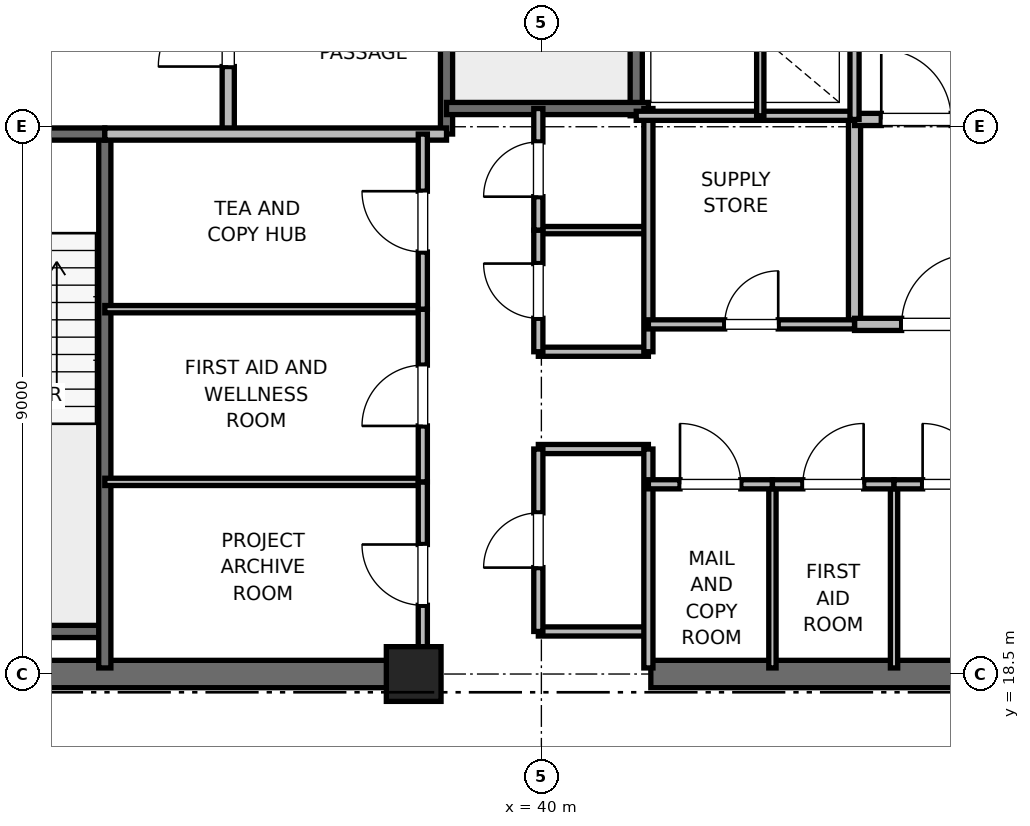
"""IFC4 building model, lengths in metres.
Left out: names, types, materials, properties, quantities, classifications, styles, units other than length and angle.
Written with IfcOpenShell. Run it as: python <this file> out.ifc"""

import sys

from ifc_helpers import new_model, si_unit, direction, frame, frame_2d, origin, origin_2d, place, context, subcontext, project, spatial, rectangle, extrude, element, fill, save


model = new_model("IFC4")
c1 = context("Model", 3, precision=1e-05, world=origin(), true_north=direction((0.0, 1.0)))
c2 = subcontext(c1, "Body", "Model", "MODEL_VIEW")
j1 = project(units=[si_unit("LENGTHUNIT", "METRE"), si_unit("PLANEANGLEUNIT", "RADIAN")], contexts=[c1])
p1 = place(None, origin())
s1 = spatial("IfcSite", under=j1, at=p1, CompositionType="ELEMENT")
p2 = place(p1, origin())
s2 = spatial("IfcBuilding", under=s1, at=p2, CompositionType="ELEMENT")
p3 = place(p2, frame((0.0, 0.0, 283.2)))
s3 = spatial("IfcBuildingStorey", under=s2, at=p3, CompositionType="ELEMENT", Elevation=283.2)
p4 = place(p3, frame((37.9, 18.5, 0.0), z_axis=(0.0, 0.0, 1.0), x_axis=(1.0, 0.0, 0.0)))
e1 = element("IfcColumn", 1, at=p4, inside=s3, PredefinedType="PILASTER", context=c2, shape_type="SweptSolid", body=[
    extrude(rectangle(XDim=0.9, YDim=0.9, at=origin_2d()), origin(), (0.0, 0.0, 1.0), 4.0),
])
for number, where, z_axis, x_axis in (
    (2, (29.0, 18.5, 0.0), (0.0, 0.0, 1.0), (1.0, 0.0, 0.0)),
    (3, (41.8, 18.5, 0.0), (0.0, 0.0, 1.0), (1.0, 0.0, 0.0)),
):
    element("IfcWall", number, at=place(p3, frame(where, z_axis=z_axis, x_axis=x_axis)), inside=s3, PredefinedType="SHEAR", context=c2, shape_type="SweptSolid", body=[
        extrude(rectangle(XDim=9.2, YDim=0.45, at=frame_2d((4.6, 0.0))), origin(), (0.0, 0.0, 1.0), 3.785),
    ])
p5 = place(p3, frame((29.7, 19.2, 0.0), z_axis=(0.0, 0.0, 1.0), x_axis=(1.0, 0.0, 0.0)))
e4 = element("IfcWall", 4, at=p5, inside=s3, PredefinedType="SOLIDWALL", context=c2, shape_type="SweptSolid", body=[
    extrude(rectangle(XDim=3.12, YDim=0.2, at=frame_2d((1.56, 0.0))), origin(), (0.0, 0.0, 1.0), 3.785),
])
p6 = place(p3, frame((32.82, 18.6, 0.0), z_axis=(0.0, 0.0, 1.0), x_axis=(0.0, 1.0, 0.0)))
e5 = element("IfcWall", 5, at=p6, inside=s3, PredefinedType="SOLIDWALL", context=c2, shape_type="SweptSolid", body=[
    extrude(rectangle(XDim=8.78, YDim=0.2, at=frame_2d((4.39, 0.0))), origin(), (0.0, 0.0, 1.0), 3.785),
])
p7 = place(p3, frame((29.7, 27.38, 0.0), z_axis=(0.0, 0.0, 1.0), x_axis=(1.0, 0.0, 0.0)))
e6 = element("IfcWall", 6, at=p7, inside=s3, PredefinedType="SOLIDWALL", context=c2, shape_type="SweptSolid", body=[
    extrude(rectangle(XDim=3.12, YDim=0.2, at=frame_2d((1.56, 0.0))), origin(), (0.0, 0.0, 1.0), 3.785),
])
p8 = place(p7, frame((1.01, 0.0, 0.0)))
e7 = element("IfcOpeningElement", 7, at=p8, cuts=e6, PredefinedType="OPENING", context=c2, shape_type="SweptSolid", body=[
    extrude(rectangle(XDim=1.1, YDim=2.15, at=frame_2d((0.55, 1.075))), frame((0.0, 0.1, 0.0), z_axis=(0.0, -1.0, 0.0), x_axis=(1.0, 0.0, 0.0)), (0.0, 0.0, 1.0), 0.2),
])
p9 = place(p3, frame((38.44, 27.38, 0.0), z_axis=(0.0, 0.0, 1.0), x_axis=(0.0, 1.0, 0.0)))
e8 = element("IfcWall", 8, at=p9, inside=s3, PredefinedType="SOLIDWALL", context=c2, shape_type="SweptSolid", body=[
    extrude(rectangle(XDim=8.87, YDim=0.2, at=frame_2d((4.435, 0.0))), origin(), (0.0, 0.0, 1.0), 3.785),
])
p10 = place(p3, frame((41.56, 27.68, 0.0), z_axis=(0.0, 0.0, 1.0), x_axis=(0.0, 1.0, 0.0)))
e9 = element("IfcWall", 9, at=p10, inside=s3, PredefinedType="SOLIDWALL", context=c2, shape_type="SweptSolid", body=[
    extrude(rectangle(XDim=8.57, YDim=0.2, at=frame_2d((4.285, 0.0))), origin(), (0.0, 0.0, 1.0), 3.785),
])
p11 = place(p3, frame((38.44, 27.8, 0.0), z_axis=(0.0, 0.0, 1.0), x_axis=(1.0, 0.0, 0.0)))
e10 = element("IfcWall", 10, at=p11, inside=s3, PredefinedType="SOLIDWALL", context=c2, shape_type="SweptSolid", body=[
    extrude(rectangle(XDim=3.32, YDim=0.2, at=frame_2d((1.66, 0.0))), origin(), (0.0, 0.0, 1.0), 3.785),
])
p12 = place(p3, frame((34.85, 27.38, 0.0), z_axis=(0.0, 0.0, 1.0), x_axis=(0.0, 1.0, 0.0)))
e11 = element("IfcWall", 11, at=p12, inside=s3, PredefinedType="PARTITIONING", context=c2, shape_type="SweptSolid", body=[
    extrude(rectangle(XDim=3.37, YDim=0.2, at=frame_2d((1.685, 0.0))), origin(), (0.0, 0.0, 1.0), 3.785),
])
p13 = place(p12, frame((1.11, 0.0, 0.0)))
e12 = element("IfcOpeningElement", 12, at=p13, cuts=e11, PredefinedType="OPENING", context=c2, shape_type="SweptSolid", body=[
    extrude(rectangle(XDim=1.15, YDim=2.2, at=frame_2d((0.575, 1.1))), frame((0.0, 0.1, 0.0), z_axis=(0.0, -1.0, 0.0), x_axis=(1.0, 0.0, 0.0)), (0.0, 0.0, 1.0), 0.2),
])
p14 = place(p3, frame((32.82, 27.38, 0.0), z_axis=(0.0, 0.0, 1.0), x_axis=(1.0, 0.0, 0.0)))
e13 = element("IfcWall", 13, at=p14, inside=s3, PredefinedType="PARTITIONING", context=c2, shape_type="SweptSolid", body=[
    extrude(rectangle(XDim=5.62, YDim=0.2, at=frame_2d((2.81, 0.0))), origin(), (0.0, 0.0, 1.0), 3.785),
])
p15 = place(p3, frame((45.15, 24.25, 0.0), z_axis=(0.0, 0.0, 1.0), x_axis=(0.0, 1.0, 0.0)))
e14 = element("IfcWall", 14, at=p15, inside=s3, PredefinedType="PARTITIONING", context=c2, shape_type="SweptSolid", body=[
    extrude(rectangle(XDim=3.37, YDim=0.2, at=frame_2d((1.685, 0.0))), origin(), (0.0, 0.0, 1.0), 3.785),
])
p16 = place(p3, frame((45.15, 24.25, 0.0), z_axis=(0.0, 0.0, 1.0), x_axis=(1.0, 0.0, 0.0)))
e15 = element("IfcWall", 15, at=p16, inside=s3, PredefinedType="PARTITIONING", context=c2, shape_type="SweptSolid", body=[
    extrude(rectangle(XDim=2.7, YDim=0.2, at=frame_2d((1.35, 0.0))), origin(), (0.0, 0.0, 1.0), 3.785),
])
p17 = place(p16, frame((0.775, 0.0, 0.0)))
e16 = element("IfcOpeningElement", 16, at=p17, cuts=e15, PredefinedType="OPENING", context=c2, shape_type="SweptSolid", body=[
    extrude(rectangle(XDim=1.15, YDim=2.2, at=frame_2d((0.575, 1.1))), frame((0.0, 0.1, 0.0), z_axis=(0.0, -1.0, 0.0), x_axis=(1.0, 0.0, 0.0)), (0.0, 0.0, 1.0), 0.2),
])
p18 = place(p3, frame((45.15, 27.62, 0.0), z_axis=(0.0, 0.0, 1.0), x_axis=(1.0, 0.0, 0.0)))
e17 = element("IfcWall", 17, at=p18, inside=s3, PredefinedType="PARTITIONING", context=c2, shape_type="SweptSolid", body=[
    extrude(rectangle(XDim=2.03, YDim=0.2, at=frame_2d((1.015, 0.0))), origin(), (0.0, 0.0, 1.0), 3.785),
])
p19 = place(p18, frame((0.44, 0.0, 0.0)))
e18 = element("IfcOpeningElement", 18, at=p19, cuts=e17, PredefinedType="OPENING", context=c2, shape_type="SweptSolid", body=[
    extrude(rectangle(XDim=1.15, YDim=2.2, at=frame_2d((0.575, 1.1))), frame((0.0, 0.1, 0.0), z_axis=(0.0, -1.0, 0.0), x_axis=(1.0, 0.0, 0.0)), (0.0, 0.0, 1.0), 0.2),
])
for number, where, z_axis, x_axis in (
    (19, (39.95, 19.2, 0.0), (0.0, 0.0, 1.0), (1.0, 0.0, 0.0)),
    (20, (39.95, 22.2, 0.0), (0.0, 0.0, 1.0), (1.0, 0.0, 0.0)),
    (21, (39.95, 23.8, 0.0), (0.0, 0.0, 1.0), (1.0, 0.0, 0.0)),
):
    element("IfcWall", number, at=place(p3, frame(where, z_axis=z_axis, x_axis=x_axis)), inside=s3, PredefinedType="PARTITIONING", context=c2, shape_type="SweptSolid", body=[
        extrude(rectangle(XDim=1.81, YDim=0.15, at=frame_2d((0.905, 0.0))), origin(), (0.0, 0.0, 1.0), 2.85),
    ])
p20 = place(p3, frame((39.95, 25.8, 0.0), z_axis=(0.0, 0.0, 1.0), x_axis=(1.0, 0.0, 0.0)))
e22 = element("IfcWall", 22, at=p20, inside=s3, PredefinedType="PARTITIONING", context=c2, shape_type="SweptSolid", body=[
    extrude(rectangle(XDim=1.81, YDim=0.12, at=frame_2d((0.905, 0.0))), origin(), (0.0, 0.0, 1.0), 2.85),
])
p21 = place(p3, frame((41.76, 18.6, 0.0), z_axis=(0.0, 0.0, 1.0), x_axis=(0.0, 1.0, 0.0)))
e23 = element("IfcWall", 23, at=p21, inside=s3, PredefinedType="PARTITIONING", context=c2, shape_type="SweptSolid", body=[
    extrude(rectangle(XDim=3.6, YDim=0.15, at=frame_2d((1.8, 0.0))), origin(), (0.0, 0.0, 1.0), 2.85),
])
p22 = place(p3, frame((41.76, 23.8, 0.0), z_axis=(0.0, 0.0, 1.0), x_axis=(0.0, 1.0, 0.0)))
e24 = element("IfcWall", 24, at=p22, inside=s3, PredefinedType="PARTITIONING", context=c2, shape_type="SweptSolid", body=[
    extrude(rectangle(XDim=4.0, YDim=0.15, at=frame_2d((2.0, 0.0))), origin(), (0.0, 0.0, 1.0), 2.85),
])
p23 = place(p3, frame((39.95, 19.2, 0.0), z_axis=(0.0, 0.0, 1.0), x_axis=(0.0, 1.0, 0.0)))
e25 = element("IfcWall", 25, at=p23, inside=s3, PredefinedType="PARTITIONING", context=c2, shape_type="SweptSolid", body=[
    extrude(rectangle(XDim=3.0, YDim=0.15, at=frame_2d((1.5, 0.0))), origin(), (0.0, 0.0, 1.0), 2.85),
])
p24 = place(p23, frame((1.05, 0.0, 0.0)))
e26 = element("IfcOpeningElement", 26, at=p24, cuts=e25, PredefinedType="OPENING", context=c2, shape_type="SweptSolid", body=[
    extrude(rectangle(XDim=0.9, YDim=2.1, at=frame_2d((0.45, 1.05))), frame((0.0, 0.075, 0.0), z_axis=(0.0, -1.0, 0.0), x_axis=(1.0, 0.0, 0.0)), (0.0, 0.0, 1.0), 0.15),
])
p25 = place(p3, frame((39.95, 23.8, 0.0), z_axis=(0.0, 0.0, 1.0), x_axis=(0.0, 1.0, 0.0)))
e27 = element("IfcWall", 27, at=p25, inside=s3, PredefinedType="PARTITIONING", context=c2, shape_type="SweptSolid", body=[
    extrude(rectangle(XDim=2.0, YDim=0.15, at=frame_2d((1.0, 0.0))), origin(), (0.0, 0.0, 1.0), 2.85),
])
p26 = place(p25, frame((0.55, 0.0, 0.0)))
e28 = element("IfcOpeningElement", 28, at=p26, cuts=e27, PredefinedType="OPENING", context=c2, shape_type="SweptSolid", body=[
    extrude(rectangle(XDim=0.9, YDim=2.1, at=frame_2d((0.45, 1.05))), frame((0.0, 0.075, 0.0), z_axis=(0.0, -1.0, 0.0), x_axis=(1.0, 0.0, 0.0)), (0.0, 0.0, 1.0), 0.15),
])
p27 = place(p3, frame((39.95, 25.8, 0.0), z_axis=(0.0, 0.0, 1.0), x_axis=(0.0, 1.0, 0.0)))
e29 = element("IfcWall", 29, at=p27, inside=s3, PredefinedType="PARTITIONING", context=c2, shape_type="SweptSolid", body=[
    extrude(rectangle(XDim=2.0, YDim=0.15, at=frame_2d((1.0, 0.0))), origin(), (0.0, 0.0, 1.0), 2.85),
])
p28 = place(p27, frame((0.55, 0.0, 0.0)))
e30 = element("IfcOpeningElement", 30, at=p28, cuts=e29, PredefinedType="OPENING", context=c2, shape_type="SweptSolid", body=[
    extrude(rectangle(XDim=0.9, YDim=2.1, at=frame_2d((0.45, 1.05))), frame((0.0, 0.075, 0.0), z_axis=(0.0, -1.0, 0.0), x_axis=(1.0, 0.0, 0.0)), (0.0, 0.0, 1.0), 0.15),
])
for number, where, z_axis, x_axis in (
    (31, (32.82, 21.66, 0.0), (0.0, 0.0, 1.0), (1.0, 0.0, 0.0)),
    (32, (32.82, 24.5, 0.0), (0.0, 0.0, 1.0), (1.0, 0.0, 0.0)),
):
    element("IfcWall", number, at=place(p3, frame(where, z_axis=z_axis, x_axis=x_axis)), inside=s3, PredefinedType="PARTITIONING", context=c2, shape_type="SweptSolid", body=[
        extrude(rectangle(XDim=5.23, YDim=0.12, at=frame_2d((2.615, 0.0))), origin(), (0.0, 0.0, 1.0), 2.85),
    ])
p29 = place(p3, frame((38.05, 18.6, 0.0), z_axis=(0.0, 0.0, 1.0), x_axis=(0.0, 1.0, 0.0)))
e33 = element("IfcWall", 33, at=p29, inside=s3, PredefinedType="PARTITIONING", context=c2, shape_type="SweptSolid", body=[
    extrude(rectangle(XDim=3.06, YDim=0.15, at=frame_2d((1.53, 0.0))), origin(), (0.0, 0.0, 1.0), 2.85),
])
p30 = place(p29, frame((1.03, 0.0, 0.0)))
e34 = element("IfcOpeningElement", 34, at=p30, cuts=e33, PredefinedType="OPENING", context=c2, shape_type="SweptSolid", body=[
    extrude(rectangle(XDim=1.0, YDim=2.15, at=frame_2d((0.5, 1.075))), frame((0.0, 0.075, 0.0), z_axis=(0.0, -1.0, 0.0), x_axis=(1.0, 0.0, 0.0)), (0.0, 0.0, 1.0), 0.15),
])
p31 = place(p3, frame((38.05, 21.66, 0.0), z_axis=(0.0, 0.0, 1.0), x_axis=(0.0, 1.0, 0.0)))
e35 = element("IfcWall", 35, at=p31, inside=s3, PredefinedType="PARTITIONING", context=c2, shape_type="SweptSolid", body=[
    extrude(rectangle(XDim=2.84, YDim=0.15, at=frame_2d((1.42, 0.0))), origin(), (0.0, 0.0, 1.0), 2.85),
])
p32 = place(p31, frame((0.92, 0.0, 0.0)))
e36 = element("IfcOpeningElement", 36, at=p32, cuts=e35, PredefinedType="OPENING", context=c2, shape_type="SweptSolid", body=[
    extrude(rectangle(XDim=1.0, YDim=2.15, at=frame_2d((0.5, 1.075))), frame((0.0, 0.075, 0.0), z_axis=(0.0, -1.0, 0.0), x_axis=(1.0, 0.0, 0.0)), (0.0, 0.0, 1.0), 0.15),
])
p33 = place(p3, frame((38.05, 24.5, 0.0), z_axis=(0.0, 0.0, 1.0), x_axis=(0.0, 1.0, 0.0)))
e37 = element("IfcWall", 37, at=p33, inside=s3, PredefinedType="PARTITIONING", context=c2, shape_type="SweptSolid", body=[
    extrude(rectangle(XDim=2.88, YDim=0.15, at=frame_2d((1.44, 0.0))), origin(), (0.0, 0.0, 1.0), 2.85),
])
p34 = place(p33, frame((0.94, 0.0, 0.0)))
e38 = element("IfcOpeningElement", 38, at=p34, cuts=e37, PredefinedType="OPENING", context=c2, shape_type="SweptSolid", body=[
    extrude(rectangle(XDim=1.0, YDim=2.15, at=frame_2d((0.5, 1.075))), frame((0.0, 0.075, 0.0), z_axis=(0.0, -1.0, 0.0), x_axis=(1.0, 0.0, 0.0)), (0.0, 0.0, 1.0), 0.15),
])
p35 = place(p3, frame((41.56, 27.68, 0.0), z_axis=(0.0, 0.0, 1.0), x_axis=(1.0, 0.0, 0.0)))
e39 = element("IfcWall", 39, at=p35, inside=s3, PredefinedType="PARTITIONING", context=c2, shape_type="SweptSolid", body=[
    extrude(rectangle(XDim=3.59, YDim=0.15, at=frame_2d((1.795, 0.0))), origin(), (0.0, 0.0, 1.0), 2.85),
])
for number, where, z_axis, x_axis in (
    (40, (43.8, 18.6, 0.0), (0.0, 0.0, 1.0), (0.0, 1.0, 0.0)),
    (41, (45.8, 18.6, 0.0), (0.0, 0.0, 1.0), (0.0, 1.0, 0.0)),
):
    element("IfcWall", number, at=place(p3, frame(where, z_axis=z_axis, x_axis=x_axis)), inside=s3, PredefinedType="PARTITIONING", context=c2, shape_type="SweptSolid", body=[
        extrude(rectangle(XDim=3.02, YDim=0.12, at=frame_2d((1.51, 0.0))), origin(), (0.0, 0.0, 1.0), 2.85),
    ])
p36 = place(p3, frame((41.76, 21.62, 0.0), z_axis=(0.0, 0.0, 1.0), x_axis=(1.0, 0.0, 0.0)))
e42 = element("IfcWall", 42, at=p36, inside=s3, PredefinedType="PARTITIONING", context=c2, shape_type="SweptSolid", body=[
    extrude(rectangle(XDim=2.04, YDim=0.15, at=frame_2d((1.02, 0.0))), origin(), (0.0, 0.0, 1.0), 2.85),
])
p37 = place(p36, frame((0.52, 0.0, 0.0)))
e43 = element("IfcOpeningElement", 43, at=p37, cuts=e42, PredefinedType="OPENING", context=c2, shape_type="SweptSolid", body=[
    extrude(rectangle(XDim=1.0, YDim=2.15, at=frame_2d((0.5, 1.075))), frame((0.0, 0.075, 0.0), z_axis=(0.0, -1.0, 0.0), x_axis=(1.0, 0.0, 0.0)), (0.0, 0.0, 1.0), 0.15),
])
p38 = place(p3, frame((43.8, 21.62, 0.0), z_axis=(0.0, 0.0, 1.0), x_axis=(1.0, 0.0, 0.0)))
e44 = element("IfcWall", 44, at=p38, inside=s3, PredefinedType="PARTITIONING", context=c2, shape_type="SweptSolid", body=[
    extrude(rectangle(XDim=2.0, YDim=0.15, at=frame_2d((1.0, 0.0))), origin(), (0.0, 0.0, 1.0), 2.85),
])
p39 = place(p38, frame((0.5, 0.0, 0.0)))
e45 = element("IfcOpeningElement", 45, at=p39, cuts=e44, PredefinedType="OPENING", context=c2, shape_type="SweptSolid", body=[
    extrude(rectangle(XDim=1.0, YDim=2.15, at=frame_2d((0.5, 1.075))), frame((0.0, 0.075, 0.0), z_axis=(0.0, -1.0, 0.0), x_axis=(1.0, 0.0, 0.0)), (0.0, 0.0, 1.0), 0.15),
])
p40 = place(p3, frame((45.8, 21.62, 0.0), z_axis=(0.0, 0.0, 1.0), x_axis=(1.0, 0.0, 0.0)))
e46 = element("IfcWall", 46, at=p40, inside=s3, PredefinedType="PARTITIONING", context=c2, shape_type="SweptSolid", body=[
    extrude(rectangle(XDim=1.94, YDim=0.15, at=frame_2d((0.97, 0.0))), origin(), (0.0, 0.0, 1.0), 2.85),
])
p41 = place(p40, frame((0.47, 0.0, 0.0)))
e47 = element("IfcOpeningElement", 47, at=p41, cuts=e46, PredefinedType="OPENING", context=c2, shape_type="SweptSolid", body=[
    extrude(rectangle(XDim=1.0, YDim=2.15, at=frame_2d((0.5, 1.075))), frame((0.0, 0.075, 0.0), z_axis=(0.0, -1.0, 0.0), x_axis=(1.0, 0.0, 0.0)), (0.0, 0.0, 1.0), 0.15),
])
p42 = place(p3, frame((41.76, 24.25, 0.0), z_axis=(0.0, 0.0, 1.0), x_axis=(1.0, 0.0, 0.0)))
e48 = element("IfcWall", 48, at=p42, inside=s3, PredefinedType="PARTITIONING", context=c2, shape_type="SweptSolid", body=[
    extrude(rectangle(XDim=3.39, YDim=0.15, at=frame_2d((1.695, 0.0))), origin(), (0.0, 0.0, 1.0), 2.85),
])
p43 = place(p42, frame((1.255, 0.0, 0.0)))
e49 = element("IfcOpeningElement", 49, at=p43, cuts=e48, PredefinedType="OPENING", context=c2, shape_type="SweptSolid", body=[
    extrude(rectangle(XDim=0.88, YDim=2.1, at=frame_2d((0.44, 1.05))), frame((0.0, 0.075, 0.0), z_axis=(0.0, -1.0, 0.0), x_axis=(1.0, 0.0, 0.0)), (0.0, 0.0, 1.0), 0.15),
])
p44 = place(p3, frame((45.15, 27.62, 0.0), z_axis=(0.0, 0.0, 1.0), x_axis=(0.0, 1.0, 0.0)))
e50 = element("IfcWall", 50, at=p44, inside=s3, PredefinedType="PARTITIONING", context=c2, shape_type="SweptSolid", body=[
    extrude(rectangle(XDim=3.1, YDim=0.15, at=frame_2d((1.55, 0.0))), origin(), (0.0, 0.0, 1.0), 2.85),
])
p45 = place(p3, frame((43.6, 27.68, 0.0), z_axis=(0.0, 0.0, 1.0), x_axis=(0.0, 1.0, 0.0)))
e51 = element("IfcWall", 51, at=p45, inside=s3, PredefinedType="PARTITIONING", context=c2, shape_type="SweptSolid", body=[
    extrude(rectangle(XDim=3.04, YDim=0.12, at=frame_2d((1.52, 0.0))), origin(), (0.0, 0.0, 1.0), 2.85),
])
p46 = place(p13, origin())
e52 = element("IfcDoor", 52, at=p46, inside=s3, OperationType="SINGLE_SWING_LEFT", PredefinedType="DOOR", context=c2, shape_type="SweptSolid", body=[
    extrude(rectangle(XDim=1.15, YDim=2.2, at=frame_2d((0.575, 1.1))), frame((0.0, 0.025, 0.0), z_axis=(0.0, -1.0, 0.0), x_axis=(1.0, 0.0, 0.0)), (0.0, 0.0, 1.0), 0.05),
])
fill(e12, e52)
p47 = place(p17, origin())
e53 = element("IfcDoor", 53, at=p47, inside=s3, OperationType="SINGLE_SWING_RIGHT", PredefinedType="DOOR", context=c2, shape_type="SweptSolid", body=[
    extrude(rectangle(XDim=1.15, YDim=2.2, at=frame_2d((0.575, 1.1))), frame((0.0, 0.025, 0.0), z_axis=(0.0, -1.0, 0.0), x_axis=(1.0, 0.0, 0.0)), (0.0, 0.0, 1.0), 0.05),
])
fill(e16, e53)
p48 = place(p19, origin())
e54 = element("IfcDoor", 54, at=p48, inside=s3, OperationType="SINGLE_SWING_LEFT", PredefinedType="DOOR", context=c2, shape_type="SweptSolid", body=[
    extrude(rectangle(XDim=1.15, YDim=2.2, at=frame_2d((0.575, 1.1))), frame((0.0, 0.025, 0.0), z_axis=(0.0, -1.0, 0.0), x_axis=(1.0, 0.0, 0.0)), (0.0, 0.0, 1.0), 0.05),
])
fill(e18, e54)
p49 = place(p24, origin())
e55 = element("IfcDoor", 55, at=p49, inside=s3, OperationType="SINGLE_SWING_LEFT", PredefinedType="DOOR", context=c2, shape_type="SweptSolid", body=[
    extrude(rectangle(XDim=0.9, YDim=2.1, at=frame_2d((0.45, 1.05))), frame((0.0, 0.025, 0.0), z_axis=(0.0, -1.0, 0.0), x_axis=(1.0, 0.0, 0.0)), (0.0, 0.0, 1.0), 0.05),
])
fill(e26, e55)
p50 = place(p26, origin())
e56 = element("IfcDoor", 56, at=p50, inside=s3, OperationType="SINGLE_SWING_RIGHT", PredefinedType="DOOR", context=c2, shape_type="SweptSolid", body=[
    extrude(rectangle(XDim=0.9, YDim=2.1, at=frame_2d((0.45, 1.05))), frame((0.0, 0.025, 0.0), z_axis=(0.0, -1.0, 0.0), x_axis=(1.0, 0.0, 0.0)), (0.0, 0.0, 1.0), 0.05),
])
fill(e28, e56)
p51 = place(p28, origin())
e57 = element("IfcDoor", 57, at=p51, inside=s3, OperationType="SINGLE_SWING_LEFT", PredefinedType="DOOR", context=c2, shape_type="SweptSolid", body=[
    extrude(rectangle(XDim=0.9, YDim=2.1, at=frame_2d((0.45, 1.05))), frame((0.0, 0.025, 0.0), z_axis=(0.0, -1.0, 0.0), x_axis=(1.0, 0.0, 0.0)), (0.0, 0.0, 1.0), 0.05),
])
fill(e30, e57)
p52 = place(p30, origin())
e58 = element("IfcDoor", 58, at=p52, inside=s3, OperationType="SINGLE_SWING_RIGHT", PredefinedType="DOOR", context=c2, shape_type="SweptSolid", body=[
    extrude(rectangle(XDim=1.0, YDim=2.15, at=frame_2d((0.5, 1.075))), frame((0.0, 0.025, 0.0), z_axis=(0.0, -1.0, 0.0), x_axis=(1.0, 0.0, 0.0)), (0.0, 0.0, 1.0), 0.05),
])
fill(e34, e58)
p53 = place(p32, origin())
e59 = element("IfcDoor", 59, at=p53, inside=s3, OperationType="SINGLE_SWING_LEFT", PredefinedType="DOOR", context=c2, shape_type="SweptSolid", body=[
    extrude(rectangle(XDim=1.0, YDim=2.15, at=frame_2d((0.5, 1.075))), frame((0.0, 0.025, 0.0), z_axis=(0.0, -1.0, 0.0), x_axis=(1.0, 0.0, 0.0)), (0.0, 0.0, 1.0), 0.05),
])
fill(e36, e59)
p54 = place(p34, origin())
e60 = element("IfcDoor", 60, at=p54, inside=s3, OperationType="SINGLE_SWING_RIGHT", PredefinedType="DOOR", context=c2, shape_type="SweptSolid", body=[
    extrude(rectangle(XDim=1.0, YDim=2.15, at=frame_2d((0.5, 1.075))), frame((0.0, 0.025, 0.0), z_axis=(0.0, -1.0, 0.0), x_axis=(1.0, 0.0, 0.0)), (0.0, 0.0, 1.0), 0.05),
])
fill(e38, e60)
p55 = place(p37, origin())
e61 = element("IfcDoor", 61, at=p55, inside=s3, OperationType="SINGLE_SWING_LEFT", PredefinedType="DOOR", context=c2, shape_type="SweptSolid", body=[
    extrude(rectangle(XDim=1.0, YDim=2.15, at=frame_2d((0.5, 1.075))), frame((0.0, 0.025, 0.0), z_axis=(0.0, -1.0, 0.0), x_axis=(1.0, 0.0, 0.0)), (0.0, 0.0, 1.0), 0.05),
])
fill(e43, e61)
p56 = place(p39, origin())
e62 = element("IfcDoor", 62, at=p56, inside=s3, OperationType="SINGLE_SWING_RIGHT", PredefinedType="DOOR", context=c2, shape_type="SweptSolid", body=[
    extrude(rectangle(XDim=1.0, YDim=2.15, at=frame_2d((0.5, 1.075))), frame((0.0, 0.025, 0.0), z_axis=(0.0, -1.0, 0.0), x_axis=(1.0, 0.0, 0.0)), (0.0, 0.0, 1.0), 0.05),
])
fill(e45, e62)
p57 = place(p41, origin())
e63 = element("IfcDoor", 63, at=p57, inside=s3, OperationType="SINGLE_SWING_LEFT", PredefinedType="DOOR", context=c2, shape_type="SweptSolid", body=[
    extrude(rectangle(XDim=1.0, YDim=2.15, at=frame_2d((0.5, 1.075))), frame((0.0, 0.025, 0.0), z_axis=(0.0, -1.0, 0.0), x_axis=(1.0, 0.0, 0.0)), (0.0, 0.0, 1.0), 0.05),
])
fill(e47, e63)
p58 = place(p43, origin())
e64 = element("IfcDoor", 64, at=p58, inside=s3, OperationType="SINGLE_SWING_RIGHT", PredefinedType="DOOR", context=c2, shape_type="SweptSolid", body=[
    extrude(rectangle(XDim=0.88, YDim=2.1, at=frame_2d((0.44, 1.05))), frame((0.0, 0.025, 0.0), z_axis=(0.0, -1.0, 0.0), x_axis=(1.0, 0.0, 0.0)), (0.0, 0.0, 1.0), 0.05),
])
fill(e49, e64)
save(model, sys.argv[1])
